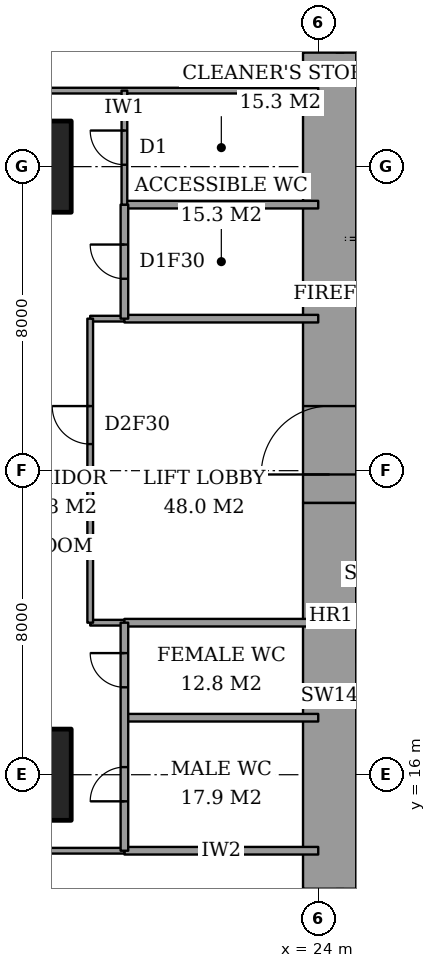
"""IFC4 building model, lengths in metres.
Left out: names, types, materials, properties, quantities, classifications, styles, units other than length and angle.
Written with IfcOpenShell. Run it as: python <this file> out.ifc"""

import sys

from ifc_helpers import new_model, si_unit, direction, frame, frame_2d, origin, origin_2d, place, context, subcontext, project, spatial, rectangle, extrude, element, fill, save


model = new_model("IFC4")
c1 = context("Model", 3, precision=1e-05, world=origin(), true_north=direction((0.0, 1.0)))
c2 = subcontext(c1, "Body", "Model", "MODEL_VIEW")
j1 = project(units=[si_unit("LENGTHUNIT", "METRE"), si_unit("PLANEANGLEUNIT", "RADIAN")], contexts=[c1])
p1 = place(None, origin())
s1 = spatial("IfcSite", under=j1, at=p1, CompositionType="ELEMENT")
p2 = place(p1, origin())
s2 = spatial("IfcBuilding", under=s1, at=p2, CompositionType="ELEMENT")
p3 = place(p2, frame((0.0, 0.0, 218.2)))
s3 = spatial("IfcBuildingStorey", under=s2, at=p3, CompositionType="ELEMENT", Elevation=218.2)
for number, where, z_axis, x_axis in (
    (1, (16.0, 16.0, 0.0), (0.0, 0.0, 1.0), (1.0, 0.0, 0.0)),
    (2, (16.0, 32.0, 0.0), (0.0, 0.0, 1.0), (1.0, 0.0, 0.0)),
):
    element("IfcColumn", number, at=place(p3, frame(where, z_axis=z_axis, x_axis=x_axis)), inside=s3, PredefinedType="COLUMN", context=c2, shape_type="SweptSolid", body=[
        extrude(rectangle(XDim=3.0, YDim=2.4, at=origin_2d()), origin(), (0.0, 0.0, 1.0), 3.6),
    ])
p4 = place(p3, frame((24.3, 13.0, 0.0), z_axis=(0.0, 0.0, 1.0), x_axis=(0.0, 1.0, 0.0)))
e3 = element("IfcWall", 3, at=p4, inside=s3, PredefinedType="SHEAR", context=c2, shape_type="SweptSolid", body=[
    extrude(rectangle(XDim=10.15, YDim=1.4, at=frame_2d((5.075, 0.0))), origin(), (0.0, 0.0, 1.0), 3.6),
])
p5 = place(p3, frame((24.3, 23.15, 0.0), z_axis=(0.0, 0.0, 1.0), x_axis=(0.0, 1.0, 0.0)))
e4 = element("IfcWall", 4, at=p5, inside=s3, PredefinedType="SHEAR", context=c2, shape_type="SweptSolid", body=[
    extrude(rectangle(XDim=11.85, YDim=1.4, at=frame_2d((5.925, 0.0))), origin(), (0.0, 0.0, 1.0), 3.6),
])
p6 = place(p5, frame((0.75, 0.0, 0.0)))
e5 = element("IfcOpeningElement", 5, at=p6, cuts=e4, PredefinedType="OPENING", context=c2, shape_type="SweptSolid", body=[
    extrude(rectangle(XDim=1.8, YDim=2.4, at=frame_2d((0.9, 1.2))), frame((0.0, 0.71, 0.0), z_axis=(0.0, -1.0, 0.0), x_axis=(1.0, 0.0, 0.0)), (0.0, 0.0, 1.0), 1.42),
])
p7 = place(p3, frame((18.9, 14.0, 0.0), z_axis=(0.0, 0.0, 1.0), x_axis=(1.0, 0.0, 0.0)))
e6 = element("IfcWall", 6, at=p7, inside=s3, PredefinedType="PARTITIONING", context=c2, shape_type="SweptSolid", body=[
    extrude(rectangle(XDim=5.1, YDim=0.2, at=frame_2d((2.55, 0.0))), origin(), (0.0, 0.0, 1.0), 3.35),
])
p8 = place(p3, frame((6.75, 14.0, 0.0), z_axis=(0.0, 0.0, 1.0), x_axis=(1.0, 0.0, 0.0)))
e7 = element("IfcWall", 7, at=p8, inside=s3, PredefinedType="PARTITIONING", context=c2, shape_type="SweptSolid", body=[
    extrude(rectangle(XDim=12.15, YDim=0.15, at=frame_2d((6.075, 0.0))), origin(), (0.0, 0.0, 1.0), 3.35),
])
p9 = place(p8, frame((5.9, 0.0, 0.0)))
e8 = element("IfcOpeningElement", 8, at=p9, cuts=e7, PredefinedType="OPENING", context=c2, shape_type="SweptSolid", body=[
    extrude(rectangle(XDim=1.8, YDim=2.1, at=frame_2d((0.9, 1.05))), frame((0.0, 0.085, 0.0), z_axis=(0.0, -1.0, 0.0), x_axis=(1.0, 0.0, 0.0)), (0.0, 0.0, 1.0), 0.17),
])
for number, where, z_axis, x_axis in (
    (9, (18.9, 17.5, 0.0), (0.0, 0.0, 1.0), (1.0, 0.0, 0.0)),
    (10, (18.9, 20.0, 0.0), (0.0, 0.0, 1.0), (1.0, 0.0, 0.0)),
):
    element("IfcWall", number, at=place(p3, frame(where, z_axis=z_axis, x_axis=x_axis)), inside=s3, PredefinedType="PARTITIONING", context=c2, shape_type="SweptSolid", body=[
        extrude(rectangle(XDim=5.1, YDim=0.2, at=frame_2d((2.55, 0.0))), origin(), (0.0, 0.0, 1.0), 3.35),
    ])
p10 = place(p3, frame((18.0, 20.0, 0.0), z_axis=(0.0, 0.0, 1.0), x_axis=(1.0, 0.0, 0.0)))
e11 = element("IfcWall", 11, at=p10, inside=s3, PredefinedType="PARTITIONING", context=c2, shape_type="SweptSolid", body=[
    extrude(rectangle(XDim=0.9, YDim=0.15, at=frame_2d((0.45, 0.0))), origin(), (0.0, 0.0, 1.0), 3.35),
])
p11 = place(p3, frame((18.9, 28.0, 0.0), z_axis=(0.0, 0.0, 1.0), x_axis=(1.0, 0.0, 0.0)))
e12 = element("IfcWall", 12, at=p11, inside=s3, PredefinedType="PARTITIONING", context=c2, shape_type="SweptSolid", body=[
    extrude(rectangle(XDim=5.1, YDim=0.2, at=frame_2d((2.55, 0.0))), origin(), (0.0, 0.0, 1.0), 3.35),
])
p12 = place(p3, frame((18.0, 28.0, 0.0), z_axis=(0.0, 0.0, 1.0), x_axis=(1.0, 0.0, 0.0)))
e13 = element("IfcWall", 13, at=p12, inside=s3, PredefinedType="PARTITIONING", context=c2, shape_type="SweptSolid", body=[
    extrude(rectangle(XDim=0.9, YDim=0.15, at=frame_2d((0.45, 0.0))), origin(), (0.0, 0.0, 1.0), 3.35),
])
p13 = place(p3, frame((18.9, 31.0, 0.0), z_axis=(0.0, 0.0, 1.0), x_axis=(1.0, 0.0, 0.0)))
e14 = element("IfcWall", 14, at=p13, inside=s3, PredefinedType="PARTITIONING", context=c2, shape_type="SweptSolid", body=[
    extrude(rectangle(XDim=5.1, YDim=0.2, at=frame_2d((2.55, 0.0))), origin(), (0.0, 0.0, 1.0), 3.35),
])
p14 = place(p3, frame((6.75, 34.0, 0.0), z_axis=(0.0, 0.0, 1.0), x_axis=(1.0, 0.0, 0.0)))
e15 = element("IfcWall", 15, at=p14, inside=s3, PredefinedType="PARTITIONING", context=c2, shape_type="SweptSolid", body=[
    extrude(rectangle(XDim=17.25, YDim=0.15, at=frame_2d((8.625, 0.0))), origin(), (0.0, 0.0, 1.0), 3.35),
])
p15 = place(p14, frame((5.9, 0.0, 0.0)))
e16 = element("IfcOpeningElement", 16, at=p15, cuts=e15, PredefinedType="OPENING", context=c2, shape_type="SweptSolid", body=[
    extrude(rectangle(XDim=1.8, YDim=2.1, at=frame_2d((0.9, 1.05))), frame((0.0, 0.085, 0.0), z_axis=(0.0, -1.0, 0.0), x_axis=(1.0, 0.0, 0.0)), (0.0, 0.0, 1.0), 0.17),
])
p16 = place(p3, frame((18.0, 20.0, 0.0), z_axis=(0.0, 0.0, 1.0), x_axis=(0.0, 1.0, 0.0)))
e17 = element("IfcWall", 17, at=p16, inside=s3, PredefinedType="PARTITIONING", context=c2, shape_type="SweptSolid", body=[
    extrude(rectangle(XDim=8.0, YDim=0.15, at=frame_2d((4.0, 0.0))), origin(), (0.0, 0.0, 1.0), 3.35),
])
p17 = place(p16, frame((4.7, 0.0, 0.0)))
e18 = element("IfcOpeningElement", 18, at=p17, cuts=e17, PredefinedType="OPENING", context=c2, shape_type="SweptSolid", body=[
    extrude(rectangle(XDim=1.0, YDim=2.1, at=frame_2d((0.5, 1.05))), frame((0.0, 0.085, 0.0), z_axis=(0.0, -1.0, 0.0), x_axis=(1.0, 0.0, 0.0)), (0.0, 0.0, 1.0), 0.17),
])
p18 = place(p3, frame((18.9, 14.0, 0.0), z_axis=(0.0, 0.0, 1.0), x_axis=(0.0, 1.0, 0.0)))
e19 = element("IfcWall", 19, at=p18, inside=s3, PredefinedType="PARTITIONING", context=c2, shape_type="SweptSolid", body=[
    extrude(rectangle(XDim=6.0, YDim=0.2, at=frame_2d((3.0, 0.0))), origin(), (0.0, 0.0, 1.0), 3.35),
])
p19 = place(p18, frame((1.3, 0.0, 0.0)))
e20 = element("IfcOpeningElement", 20, at=p19, cuts=e19, PredefinedType="OPENING", context=c2, shape_type="SweptSolid", body=[
    extrude(rectangle(XDim=0.9, YDim=2.1, at=frame_2d((0.45, 1.05))), frame((0.0, 0.11, 0.0), z_axis=(0.0, -1.0, 0.0), x_axis=(1.0, 0.0, 0.0)), (0.0, 0.0, 1.0), 0.22),
])
p20 = place(p18, frame((4.3, 0.0, 0.0)))
e21 = element("IfcOpeningElement", 21, at=p20, cuts=e19, PredefinedType="OPENING", context=c2, shape_type="SweptSolid", body=[
    extrude(rectangle(XDim=0.9, YDim=2.1, at=frame_2d((0.45, 1.05))), frame((0.0, 0.11, 0.0), z_axis=(0.0, -1.0, 0.0), x_axis=(1.0, 0.0, 0.0)), (0.0, 0.0, 1.0), 0.22),
])
p21 = place(p3, frame((18.9, 28.0, 0.0), z_axis=(0.0, 0.0, 1.0), x_axis=(0.0, 1.0, 0.0)))
e22 = element("IfcWall", 22, at=p21, inside=s3, PredefinedType="PARTITIONING", context=c2, shape_type="SweptSolid", body=[
    extrude(rectangle(XDim=3.0, YDim=0.2, at=frame_2d((1.5, 0.0))), origin(), (0.0, 0.0, 1.0), 3.35),
])
p22 = place(p21, frame((1.05, 0.0, 0.0)))
e23 = element("IfcOpeningElement", 23, at=p22, cuts=e22, PredefinedType="OPENING", context=c2, shape_type="SweptSolid", body=[
    extrude(rectangle(XDim=0.9, YDim=2.1, at=frame_2d((0.45, 1.05))), frame((0.0, 0.11, 0.0), z_axis=(0.0, -1.0, 0.0), x_axis=(1.0, 0.0, 0.0)), (0.0, 0.0, 1.0), 0.22),
])
p23 = place(p3, frame((18.9, 31.0, 0.0), z_axis=(0.0, 0.0, 1.0), x_axis=(0.0, 1.0, 0.0)))
e24 = element("IfcWall", 24, at=p23, inside=s3, PredefinedType="PARTITIONING", context=c2, shape_type="SweptSolid", body=[
    extrude(rectangle(XDim=3.0, YDim=0.15, at=frame_2d((1.5, 0.0))), origin(), (0.0, 0.0, 1.0), 3.35),
])
p24 = place(p23, frame((1.05, 0.0, 0.0)))
e25 = element("IfcOpeningElement", 25, at=p24, cuts=e24, PredefinedType="OPENING", context=c2, shape_type="SweptSolid", body=[
    extrude(rectangle(XDim=0.9, YDim=2.1, at=frame_2d((0.45, 1.05))), frame((0.0, 0.085, 0.0), z_axis=(0.0, -1.0, 0.0), x_axis=(1.0, 0.0, 0.0)), (0.0, 0.0, 1.0), 0.17),
])
p25 = place(p17, origin())
e26 = element("IfcDoor", 26, at=p25, inside=s3, OperationType="SINGLE_SWING_LEFT", PredefinedType="DOOR", context=c2, shape_type="SweptSolid", body=[
    extrude(rectangle(XDim=1.0, YDim=2.1, at=frame_2d((0.5, 1.05))), frame((0.0, 0.025, 0.0), z_axis=(0.0, -1.0, 0.0), x_axis=(1.0, 0.0, 0.0)), (0.0, 0.0, 1.0), 0.05),
])
fill(e18, e26)
p26 = place(p19, origin())
e27 = element("IfcDoor", 27, at=p26, inside=s3, OperationType="SINGLE_SWING_RIGHT", PredefinedType="DOOR", context=c2, shape_type="SweptSolid", body=[
    extrude(rectangle(XDim=0.9, YDim=2.1, at=frame_2d((0.45, 1.05))), frame((0.0, 0.025, 0.0), z_axis=(0.0, -1.0, 0.0), x_axis=(1.0, 0.0, 0.0)), (0.0, 0.0, 1.0), 0.05),
])
fill(e20, e27)
p27 = place(p20, origin())
e28 = element("IfcDoor", 28, at=p27, inside=s3, OperationType="SINGLE_SWING_LEFT", PredefinedType="DOOR", context=c2, shape_type="SweptSolid", body=[
    extrude(rectangle(XDim=0.9, YDim=2.1, at=frame_2d((0.45, 1.05))), frame((0.0, 0.025, 0.0), z_axis=(0.0, -1.0, 0.0), x_axis=(1.0, 0.0, 0.0)), (0.0, 0.0, 1.0), 0.05),
])
fill(e21, e28)
p28 = place(p22, origin())
e29 = element("IfcDoor", 29, at=p28, inside=s3, OperationType="SINGLE_SWING_LEFT", PredefinedType="DOOR", context=c2, shape_type="SweptSolid", body=[
    extrude(rectangle(XDim=0.9, YDim=2.1, at=frame_2d((0.45, 1.05))), frame((0.0, 0.025, 0.0), z_axis=(0.0, -1.0, 0.0), x_axis=(1.0, 0.0, 0.0)), (0.0, 0.0, 1.0), 0.05),
])
fill(e23, e29)
p29 = place(p24, origin())
e30 = element("IfcDoor", 30, at=p29, inside=s3, OperationType="SINGLE_SWING_LEFT", PredefinedType="DOOR", context=c2, shape_type="SweptSolid", body=[
    extrude(rectangle(XDim=0.9, YDim=2.1, at=frame_2d((0.45, 1.05))), frame((0.0, 0.025, 0.0), z_axis=(0.0, -1.0, 0.0), x_axis=(1.0, 0.0, 0.0)), (0.0, 0.0, 1.0), 0.05),
])
fill(e25, e30)
p30 = place(p6, origin())
e31 = element("IfcDoor", 31, at=p30, inside=s3, OperationType="DOUBLE_DOOR_DOUBLE_SWING", PredefinedType="DOOR", context=c2, shape_type="SweptSolid", body=[
    extrude(rectangle(XDim=1.8, YDim=2.4, at=frame_2d((0.9, 1.2))), frame((0.0, 0.025, 0.0), z_axis=(0.0, -1.0, 0.0), x_axis=(1.0, 0.0, 0.0)), (0.0, 0.0, 1.0), 0.05),
])
fill(e5, e31)
save(model, sys.argv[1])
